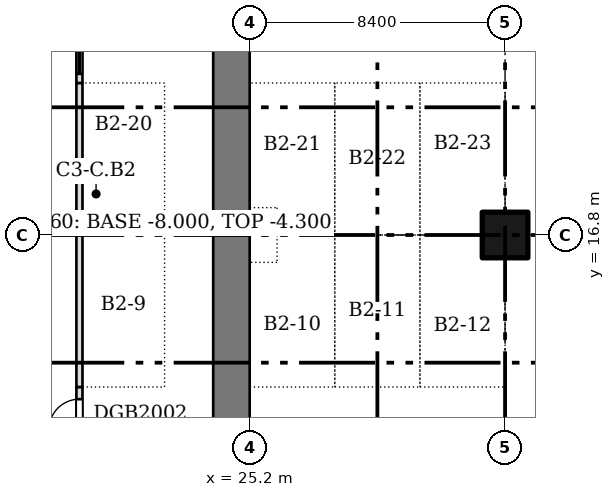
"""IFC4 building model, lengths in metres.
Left out: names, types, materials, properties, quantities, classifications, styles, units other than length and angle.
Written with IfcOpenShell. Run it as: python <this file> out.ifc"""

import sys

from ifc_helpers import new_model, si_unit, direction, frame, frame_2d, origin, origin_2d, place, context, subcontext, project, spatial, rectangle, extrude, element, fill, save


model = new_model("IFC4")
c1 = context("Model", 3, precision=1e-05, world=origin(), true_north=direction((0.0, 1.0)))
c2 = subcontext(c1, "Body", "Model", "MODEL_VIEW")
j1 = project(units=[si_unit("LENGTHUNIT", "METRE"), si_unit("PLANEANGLEUNIT", "RADIAN")], contexts=[c1])
p1 = place(None, origin())
s1 = spatial("IfcSite", under=j1, at=p1, CompositionType="ELEMENT")
p2 = place(p1, origin())
s2 = spatial("IfcBuilding", under=s1, at=p2, CompositionType="ELEMENT")
p3 = place(p2, frame((0.0, 0.0, -8.0)))
s3 = spatial("IfcBuildingStorey", under=s2, at=p3, CompositionType="ELEMENT", Elevation=-8.0)
p4 = place(p3, frame((24.6, 0.0, 0.0), z_axis=(0.0, 0.0, 1.0), x_axis=(0.0, 1.0, 0.0)))
e1 = element("IfcWall", 1, at=p4, inside=s3, PredefinedType="SHEAR", context=c2, shape_type="SweptSolid", body=[
    extrude(rectangle(XDim=25.2, YDim=1.2, at=frame_2d((12.6, 0.0))), origin(), (0.0, 0.0, 1.0), 3.7),
])
p5 = place(p3, frame((33.6, 16.8, 0.0), z_axis=(0.0, 0.0, 1.0), x_axis=(1.0, 0.0, 0.0)))
e2 = element("IfcColumn", 2, at=p5, inside=s3, PredefinedType="COLUMN", context=c2, shape_type="SweptSolid", body=[
    extrude(rectangle(XDim=1.5, YDim=1.5, at=origin_2d()), origin(), (0.0, 0.0, 1.0), 3.7),
])
p6 = place(p3, frame((19.6, 5.0, 0.0), z_axis=(0.0, 0.0, 1.0), x_axis=(0.0, 1.0, 0.0)))
e3 = element("IfcWall", 3, at=p6, inside=s3, PredefinedType="PARTITIONING", context=c2, shape_type="SweptSolid", body=[
    extrude(rectangle(XDim=6.8, YDim=0.2, at=frame_2d((3.4, 0.0))), origin(), (0.0, 0.0, 1.0), 3.7),
])
p7 = place(p6, frame((0.3, 0.0, 0.0)))
e4 = element("IfcOpeningElement", 4, at=p7, cuts=e3, PredefinedType="OPENING", context=c2, shape_type="SweptSolid", body=[
    extrude(rectangle(XDim=4.8, YDim=2.4, at=frame_2d((2.4, 1.2))), frame((0.0, 0.11, 0.0), z_axis=(0.0, -1.0, 0.0), x_axis=(1.0, 0.0, 0.0)), (0.0, 0.0, 1.0), 0.22),
])
p8 = place(p6, frame((5.4, 0.0, 0.0)))
e5 = element("IfcOpeningElement", 5, at=p8, cuts=e3, PredefinedType="OPENING", context=c2, shape_type="SweptSolid", body=[
    extrude(rectangle(XDim=1.0, YDim=2.1, at=frame_2d((0.5, 1.05))), frame((0.0, 0.11, 0.0), z_axis=(0.0, -1.0, 0.0), x_axis=(1.0, 0.0, 0.0)), (0.0, 0.0, 1.0), 0.22),
])
p9 = place(p3, frame((19.6, 11.8, 0.0), z_axis=(0.0, 0.0, 1.0), x_axis=(0.0, 1.0, 0.0)))
e6 = element("IfcWall", 6, at=p9, inside=s3, PredefinedType="PARTITIONING", context=c2, shape_type="SweptSolid", body=[
    extrude(rectangle(XDim=10.0, YDim=0.2, at=frame_2d((5.0, 0.0))), origin(), (0.0, 0.0, 1.0), 3.7),
])
p10 = place(p3, frame((19.6, 21.8, 0.0), z_axis=(0.0, 0.0, 1.0), x_axis=(0.0, 1.0, 0.0)))
e7 = element("IfcWall", 7, at=p10, inside=s3, PredefinedType="PARTITIONING", context=c2, shape_type="SweptSolid", body=[
    extrude(rectangle(XDim=6.8, YDim=0.2, at=frame_2d((3.4, 0.0))), origin(), (0.0, 0.0, 1.0), 3.7),
])
p11 = place(p10, frame((0.3, 0.0, 0.0)))
e8 = element("IfcOpeningElement", 8, at=p11, cuts=e7, PredefinedType="OPENING", context=c2, shape_type="SweptSolid", body=[
    extrude(rectangle(XDim=4.8, YDim=2.4, at=frame_2d((2.4, 1.2))), frame((0.0, 0.11, 0.0), z_axis=(0.0, -1.0, 0.0), x_axis=(1.0, 0.0, 0.0)), (0.0, 0.0, 1.0), 0.22),
])
p12 = place(p10, frame((5.4, 0.0, 0.0)))
e9 = element("IfcOpeningElement", 9, at=p12, cuts=e7, PredefinedType="OPENING", context=c2, shape_type="SweptSolid", body=[
    extrude(rectangle(XDim=1.0, YDim=2.1, at=frame_2d((0.5, 1.05))), frame((0.0, 0.11, 0.0), z_axis=(0.0, -1.0, 0.0), x_axis=(1.0, 0.0, 0.0)), (0.0, 0.0, 1.0), 0.22),
])
p13 = place(p8, origin())
e10 = element("IfcDoor", 10, at=p13, inside=s3, OperationType="SINGLE_SWING_LEFT", PredefinedType="DOOR", context=c2, shape_type="SweptSolid", body=[
    extrude(rectangle(XDim=1.0, YDim=2.1, at=frame_2d((0.5, 1.05))), frame((0.0, 0.025, 0.0), z_axis=(0.0, -1.0, 0.0), x_axis=(1.0, 0.0, 0.0)), (0.0, 0.0, 1.0), 0.05),
])
fill(e5, e10)
p14 = place(p11, origin())
e11 = element("IfcDoor", 11, at=p14, inside=s3, OperationType="ROLLINGUP", PredefinedType="GATE", context=c2, shape_type="SweptSolid", body=[
    extrude(rectangle(XDim=4.8, YDim=2.4, at=frame_2d((2.4, 1.2))), frame((0.0, 0.025, 0.0), z_axis=(0.0, -1.0, 0.0), x_axis=(1.0, 0.0, 0.0)), (0.0, 0.0, 1.0), 0.05),
])
fill(e8, e11)
save(model, sys.argv[1])
